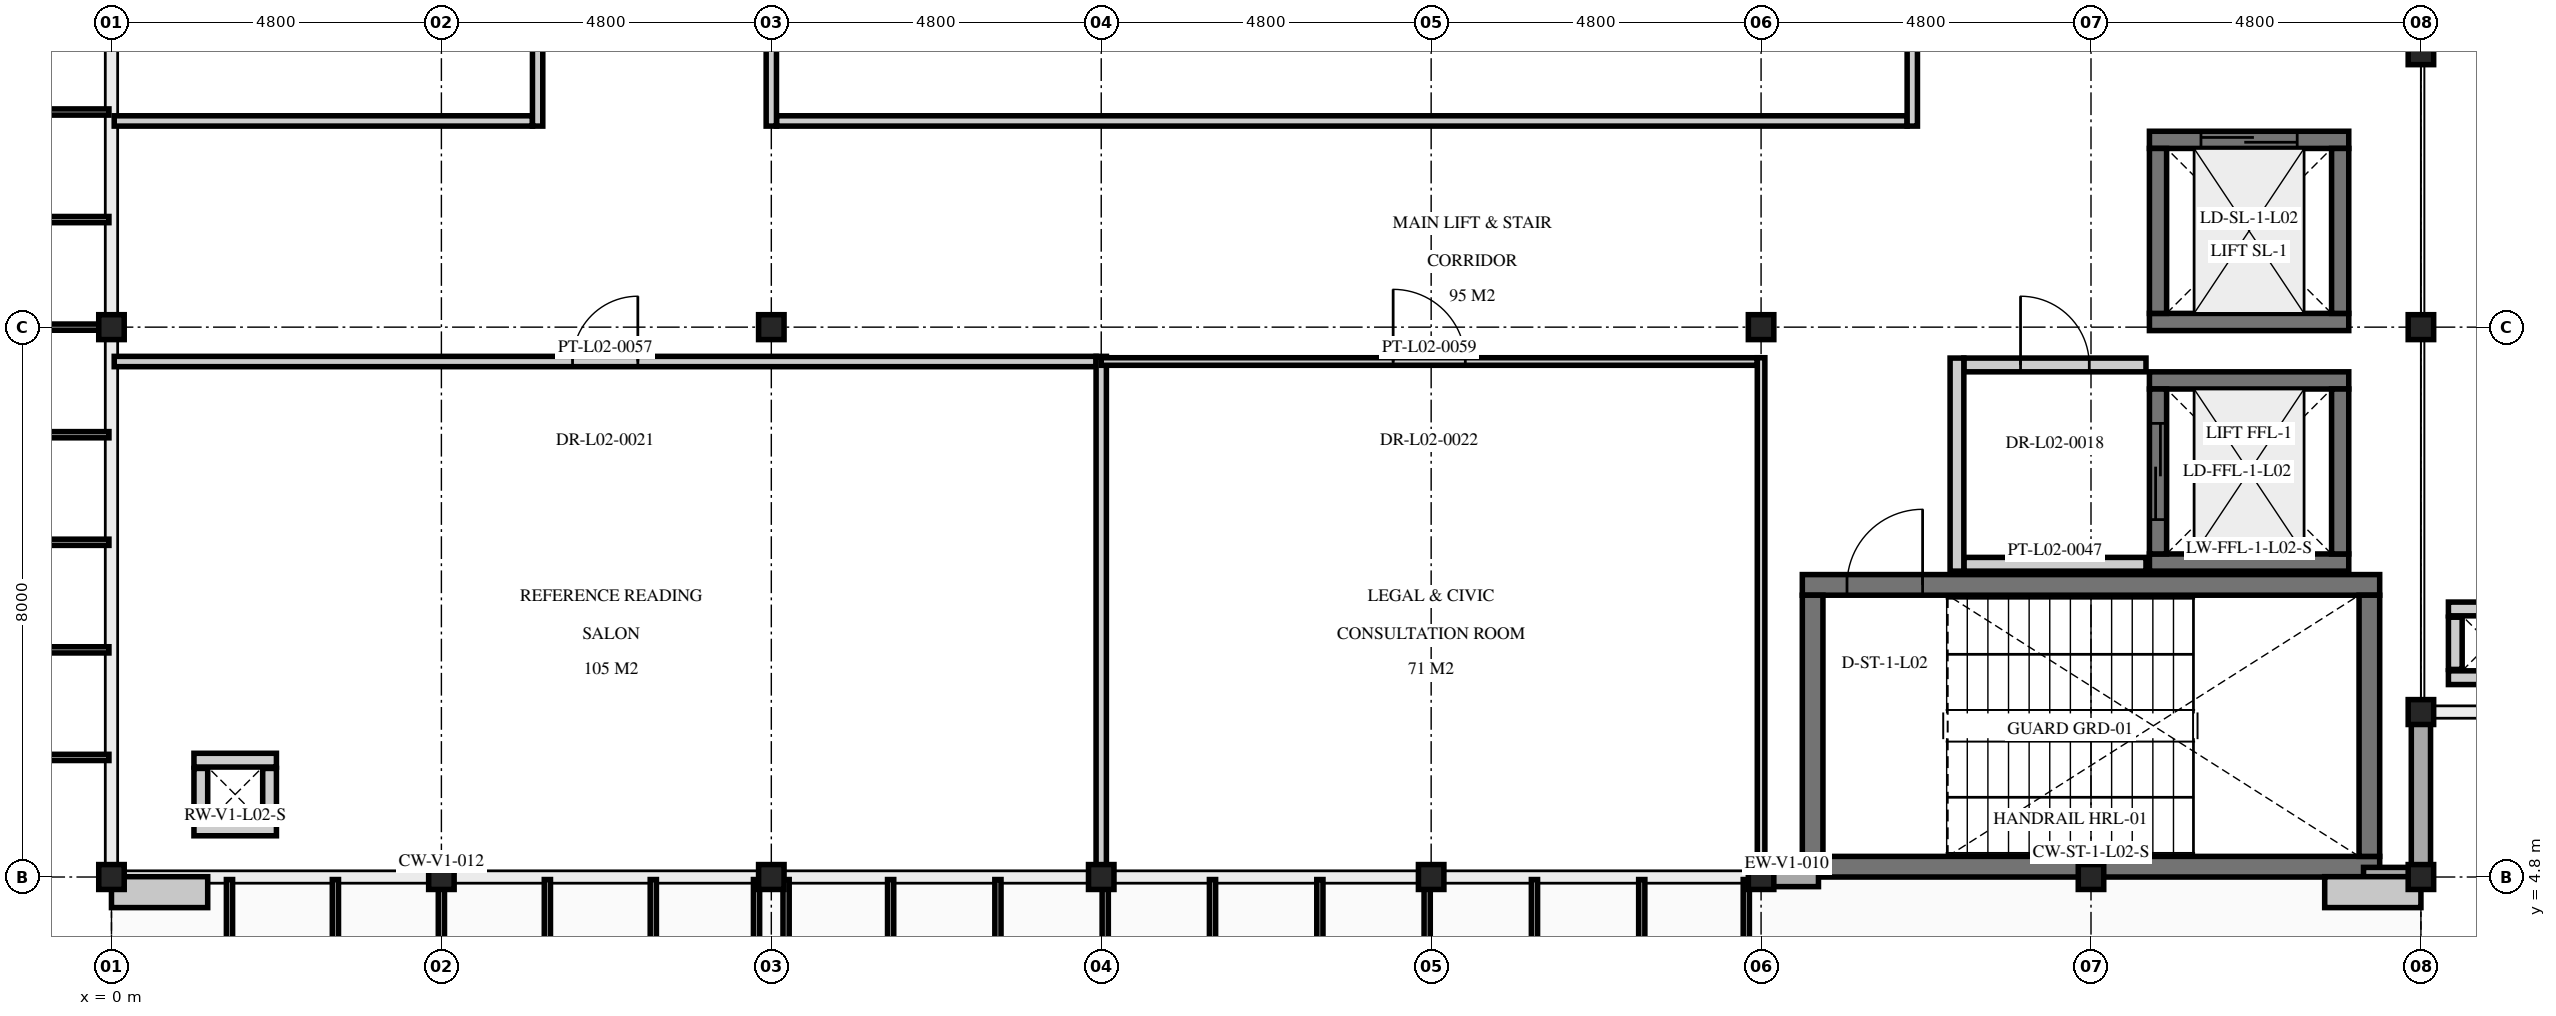
"""IFC4 building model, lengths in metres.
Left out: names, types, materials, properties, quantities, classifications, styles, units other than length and angle.
Written with IfcOpenShell. Run it as: python <this file> out.ifc"""

import sys

from ifc_helpers import new_model, si_unit, direction, frame, frame_2d, origin, origin_2d, place, context, subcontext, project, spatial, rectangle, i_section, extrude, element, fill, save


model = new_model("IFC4")
c1 = context("Model", 3, precision=1e-05, world=origin(), true_north=direction((0.0, 1.0)))
c2 = subcontext(c1, "Body", "Model", "MODEL_VIEW")
j1 = project(units=[si_unit("LENGTHUNIT", "METRE"), si_unit("PLANEANGLEUNIT", "RADIAN")], contexts=[c1])
p1 = place(None, origin())
s1 = spatial("IfcSite", under=j1, at=p1, CompositionType="ELEMENT")
p2 = place(p1, origin())
s2 = spatial("IfcBuilding", under=s1, at=p2, CompositionType="ELEMENT")
p3 = place(p2, frame((0.0, 0.0, 9.6)))
s3 = spatial("IfcBuildingStorey", under=s2, at=p3, CompositionType="ELEMENT", Elevation=9.6)
for number, where, z_axis, x_axis in (
    (1, (0.0, 4.8, 0.0), (0.0, 0.0, 1.0), (1.0, 0.0, 0.0)),
    (2, (4.8, 4.8, 0.0), (0.0, 0.0, 1.0), (1.0, 0.0, 0.0)),
    (3, (9.6, 4.8, 0.0), (0.0, 0.0, 1.0), (1.0, 0.0, 0.0)),
    (4, (14.4, 4.8, 0.0), (0.0, 0.0, 1.0), (1.0, 0.0, 0.0)),
    (5, (19.2, 4.8, 0.0), (0.0, 0.0, 1.0), (1.0, 0.0, 0.0)),
    (6, (24.0, 4.8, 0.0), (0.0, 0.0, 1.0), (1.0, 0.0, 0.0)),
    (7, (28.8, 4.8, 0.0), (0.0, 0.0, 1.0), (1.0, 0.0, 0.0)),
    (8, (33.6, 4.8, 0.0), (0.0, 0.0, 1.0), (1.0, 0.0, 0.0)),
    (9, (0.0, 12.8, 0.0), (0.0, 0.0, 1.0), (1.0, 0.0, 0.0)),
    (10, (33.6, 7.2, 0.0), (0.0, 0.0, 1.0), (1.0, 0.0, 0.0)),
    (11, (33.6, 12.8, 0.0), (0.0, 0.0, 1.0), (1.0, 0.0, 0.0)),
    (12, (33.6, 16.8, 0.0), (0.0, 0.0, 1.0), (1.0, 0.0, 0.0)),
    (13, (9.6, 12.8, 0.0), (0.0, 0.0, 1.0), (1.0, 0.0, 0.0)),
    (14, (24.0, 12.8, 0.0), (0.0, 0.0, 1.0), (1.0, 0.0, 0.0)),
):
    element("IfcColumn", number, at=place(p3, frame(where, z_axis=z_axis, x_axis=x_axis)), inside=s3, PredefinedType="COLUMN", context=c2, shape_type="SweptSolid", body=[
        extrude(i_section(OverallWidth=0.371, OverallDepth=0.362, WebThickness=0.012, FlangeThickness=0.021, at=origin_2d()), origin(), (0.0, 0.0, 1.0), 4.5),
    ])
p4 = place(p3, frame((33.0, 4.95, 0.0), z_axis=(0.0, 0.0, 1.0), x_axis=(-1.0, 0.0, 0.0)))
e15 = element("IfcWall", 15, at=p4, inside=s3, PredefinedType="SHEAR", context=c2, shape_type="SweptSolid", body=[
    extrude(rectangle(XDim=8.4, YDim=0.3, at=frame_2d((4.2, 0.0))), origin(), (0.0, 0.0, 1.0), 4.26),
])
p5 = place(p3, frame((24.6, 9.05, 0.0), z_axis=(0.0, 0.0, 1.0), x_axis=(1.0, 0.0, 0.0)))
e16 = element("IfcWall", 16, at=p5, inside=s3, PredefinedType="SHEAR", context=c2, shape_type="SweptSolid", body=[
    extrude(rectangle(XDim=8.4, YDim=0.3, at=frame_2d((4.2, 0.0))), origin(), (0.0, 0.0, 1.0), 4.26),
])
p6 = place(p5, frame((0.65, 0.0, 0.0)))
e17 = element("IfcOpeningElement", 17, at=p6, cuts=e16, PredefinedType="OPENING", context=c2, shape_type="SweptSolid", body=[
    extrude(rectangle(XDim=1.1, YDim=2.2, at=frame_2d((0.55, 1.1))), frame((0.0, 0.16, 0.0), z_axis=(0.0, -1.0, 0.0), x_axis=(1.0, 0.0, 0.0)), (0.0, 0.0, 1.0), 0.32),
])
for number, where, z_axis, x_axis in (
    (18, (24.75, 5.1, 0.0), (0.0, 0.0, 1.0), (0.0, 1.0, 0.0)),
    (19, (32.85, 8.9, 0.0), (0.0, 0.0, 1.0), (0.0, -1.0, 0.0)),
):
    element("IfcWall", number, at=place(p3, frame(where, z_axis=z_axis, x_axis=x_axis)), inside=s3, PredefinedType="SHEAR", context=c2, shape_type="SweptSolid", body=[
        extrude(rectangle(XDim=3.8, YDim=0.3, at=frame_2d((1.9, 0.0))), origin(), (0.0, 0.0, 1.0), 4.26),
    ])
for number, where, z_axis, x_axis in (
    (20, (32.55, 9.375, 0.0), (0.0, 0.0, 1.0), (-1.0, 0.0, 0.0)),
    (21, (29.65, 12.025, 0.0), (0.0, 0.0, 1.0), (1.0, 0.0, 0.0)),
):
    element("IfcWall", number, at=place(p3, frame(where, z_axis=z_axis, x_axis=x_axis)), inside=s3, PredefinedType="SHEAR", context=c2, shape_type="SweptSolid", body=[
        extrude(rectangle(XDim=2.9, YDim=0.25, at=frame_2d((1.45, 0.0))), origin(), (0.0, 0.0, 1.0), 4.26),
    ])
p7 = place(p3, frame((29.775, 9.5, 0.0), z_axis=(0.0, 0.0, 1.0), x_axis=(0.0, 1.0, 0.0)))
e22 = element("IfcWall", 22, at=p7, inside=s3, PredefinedType="SHEAR", context=c2, shape_type="SweptSolid", body=[
    extrude(rectangle(XDim=2.4, YDim=0.25, at=frame_2d((1.2, 0.0))), origin(), (0.0, 0.0, 1.0), 4.26),
])
p8 = place(p7, frame((0.5, 0.0, 0.0)))
e23 = element("IfcOpeningElement", 23, at=p8, cuts=e22, PredefinedType="OPENING", context=c2, shape_type="SweptSolid", body=[
    extrude(rectangle(XDim=1.4, YDim=2.2, at=frame_2d((0.7, 1.1))), frame((0.0, 0.135, 0.0), z_axis=(0.0, -1.0, 0.0), x_axis=(1.0, 0.0, 0.0)), (0.0, 0.0, 1.0), 0.27),
])
p9 = place(p3, frame((32.425, 11.9, 0.0), z_axis=(0.0, 0.0, 1.0), x_axis=(0.0, -1.0, 0.0)))
e24 = element("IfcWall", 24, at=p9, inside=s3, PredefinedType="SHEAR", context=c2, shape_type="SweptSolid", body=[
    extrude(rectangle(XDim=2.4, YDim=0.25, at=frame_2d((1.2, 0.0))), origin(), (0.0, 0.0, 1.0), 4.26),
])
p10 = place(p3, frame((32.55, 12.875, 0.0), z_axis=(0.0, 0.0, 1.0), x_axis=(-1.0, 0.0, 0.0)))
e25 = element("IfcWall", 25, at=p10, inside=s3, PredefinedType="SHEAR", context=c2, shape_type="SweptSolid", body=[
    extrude(rectangle(XDim=2.9, YDim=0.25, at=frame_2d((1.45, 0.0))), origin(), (0.0, 0.0, 1.0), 4.26),
])
p11 = place(p3, frame((29.65, 15.525, 0.0), z_axis=(0.0, 0.0, 1.0), x_axis=(1.0, 0.0, 0.0)))
e26 = element("IfcWall", 26, at=p11, inside=s3, PredefinedType="SHEAR", context=c2, shape_type="SweptSolid", body=[
    extrude(rectangle(XDim=2.9, YDim=0.25, at=frame_2d((1.45, 0.0))), origin(), (0.0, 0.0, 1.0), 4.26),
])
p12 = place(p11, frame((0.75, 0.0, 0.0)))
e27 = element("IfcOpeningElement", 27, at=p12, cuts=e26, PredefinedType="OPENING", context=c2, shape_type="SweptSolid", body=[
    extrude(rectangle(XDim=1.4, YDim=2.2, at=frame_2d((0.7, 1.1))), frame((0.0, 0.135, 0.0), z_axis=(0.0, -1.0, 0.0), x_axis=(1.0, 0.0, 0.0)), (0.0, 0.0, 1.0), 0.27),
])
for number, where, z_axis, x_axis in (
    (28, (29.775, 13.0, 0.0), (0.0, 0.0, 1.0), (0.0, 1.0, 0.0)),
    (29, (32.425, 15.4, 0.0), (0.0, 0.0, 1.0), (0.0, -1.0, 0.0)),
):
    element("IfcWall", number, at=place(p3, frame(where, z_axis=z_axis, x_axis=x_axis)), inside=s3, PredefinedType="SHEAR", context=c2, shape_type="SweptSolid", body=[
        extrude(rectangle(XDim=2.4, YDim=0.25, at=frame_2d((1.2, 0.0))), origin(), (0.0, 0.0, 1.0), 4.26),
    ])
for number, where, z_axis, x_axis in (
    (30, (2.4, 5.5, 0.0), (0.0, 0.0, 1.0), (-1.0, 0.0, 0.0)),
    (31, (1.2, 6.5, 0.0), (0.0, 0.0, 1.0), (1.0, 0.0, 0.0)),
):
    element("IfcWall", number, at=place(p3, frame(where, z_axis=z_axis, x_axis=x_axis)), inside=s3, PredefinedType="PARTITIONING", context=c2, shape_type="SweptSolid", body=[
        extrude(rectangle(XDim=1.2, YDim=0.2, at=frame_2d((0.6, 0.0))), origin(), (0.0, 0.0, 1.0), 3.76),
    ])
for number, where, z_axis, x_axis in (
    (32, (1.3, 5.62, 0.0), (0.0, 0.0, 1.0), (0.0, 1.0, 0.0)),
    (33, (2.3, 6.38, 0.0), (0.0, 0.0, 1.0), (0.0, -1.0, 0.0)),
):
    element("IfcWall", number, at=place(p3, frame(where, z_axis=z_axis, x_axis=x_axis)), inside=s3, PredefinedType="PARTITIONING", context=c2, shape_type="SweptSolid", body=[
        extrude(rectangle(XDim=0.76, YDim=0.2, at=frame_2d((0.38, 0.0))), origin(), (0.0, 0.0, 1.0), 3.76),
    ])
for number, where, z_axis, x_axis in (
    (34, (35.2, 7.7, 0.0), (0.0, 0.0, 1.0), (-1.0, 0.0, 0.0)),
    (35, (34.0, 8.7, 0.0), (0.0, 0.0, 1.0), (1.0, 0.0, 0.0)),
):
    element("IfcWall", number, at=place(p3, frame(where, z_axis=z_axis, x_axis=x_axis)), inside=s3, PredefinedType="PARTITIONING", context=c2, shape_type="SweptSolid", body=[
        extrude(rectangle(XDim=1.2, YDim=0.2, at=frame_2d((0.6, 0.0))), origin(), (0.0, 0.0, 1.0), 3.76),
    ])
p13 = place(p3, frame((34.1, 7.82, 0.0), z_axis=(0.0, 0.0, 1.0), x_axis=(0.0, 1.0, 0.0)))
e36 = element("IfcWall", 36, at=p13, inside=s3, PredefinedType="PARTITIONING", context=c2, shape_type="SweptSolid", body=[
    extrude(rectangle(XDim=0.76, YDim=0.2, at=frame_2d((0.38, 0.0))), origin(), (0.0, 0.0, 1.0), 3.76),
])
p14 = place(p3, frame((24.835, 4.8, 0.0), z_axis=(0.0, 0.0, 1.0), x_axis=(-1.0, 0.0, 0.0)))
e37 = element("IfcWall", 37, at=p14, inside=s3, PredefinedType="SOLIDWALL", context=c2, shape_type="SweptSolid", body=[
    extrude(rectangle(XDim=0.92, YDim=0.28, at=frame_2d((0.46, 0.0))), origin(), (0.0, 0.0, 1.0), 3.685),
])
p15 = place(p3, frame((33.685, 4.8, 0.0), z_axis=(0.0, 0.0, 1.0), x_axis=(-1.0, 0.0, 0.0)))
e38 = element("IfcWall", 38, at=p15, inside=s3, PredefinedType="SOLIDWALL", context=c2, shape_type="SweptSolid", body=[
    extrude(rectangle(XDim=0.92, YDim=0.28, at=frame_2d((0.46, 0.0))), origin(), (0.0, 0.0, 1.0), 3.685),
])
p16 = place(p3, frame((33.6, 7.285, 0.0), z_axis=(0.0, 0.0, 1.0), x_axis=(0.0, -1.0, 0.0)))
e39 = element("IfcWall", 39, at=p16, inside=s3, PredefinedType="SOLIDWALL", context=c2, shape_type="SweptSolid", body=[
    extrude(rectangle(XDim=2.57, YDim=0.28, at=frame_2d((1.285, 0.0))), origin(), (0.0, 0.0, 1.0), 3.685),
])
p17 = place(p3, frame((26.95, 9.35, 0.0), z_axis=(0.0, 0.0, 1.0), x_axis=(1.0, 0.0, 0.0)))
e40 = element("IfcWall", 40, at=p17, inside=s3, PredefinedType="PARTITIONING", context=c2, shape_type="SweptSolid", body=[
    extrude(rectangle(XDim=2.65, YDim=0.2, at=frame_2d((1.325, 0.0))), origin(), (0.0, 0.0, 1.0), 4.26),
])
p18 = place(p3, frame((26.95, 12.25, 0.0), z_axis=(0.0, 0.0, 1.0), x_axis=(1.0, 0.0, 0.0)))
e41 = element("IfcWall", 41, at=p18, inside=s3, PredefinedType="PARTITIONING", context=c2, shape_type="SweptSolid", body=[
    extrude(rectangle(XDim=2.65, YDim=0.2, at=frame_2d((1.325, 0.0))), origin(), (0.0, 0.0, 1.0), 4.26),
])
p19 = place(p18, frame((0.825, 0.0, 0.0)))
e42 = element("IfcOpeningElement", 42, at=p19, cuts=e41, PredefinedType="OPENING", context=c2, shape_type="SweptSolid", body=[
    extrude(rectangle(XDim=1.0, YDim=2.2, at=frame_2d((0.5, 1.1))), frame((0.0, 0.11, 0.0), z_axis=(0.0, -1.0, 0.0), x_axis=(1.0, 0.0, 0.0)), (0.0, 0.0, 1.0), 0.22),
])
p20 = place(p3, frame((26.85, 9.25, 0.0), z_axis=(0.0, 0.0, 1.0), x_axis=(0.0, 1.0, 0.0)))
e43 = element("IfcWall", 43, at=p20, inside=s3, PredefinedType="PARTITIONING", context=c2, shape_type="SweptSolid", body=[
    extrude(rectangle(XDim=3.1, YDim=0.2, at=frame_2d((1.55, 0.0))), origin(), (0.0, 0.0, 1.0), 4.26),
])
p21 = place(p3, frame((0.04, 12.3, 0.0), z_axis=(0.0, 0.0, 1.0), x_axis=(1.0, 0.0, 0.0)))
e44 = element("IfcWall", 44, at=p21, inside=s3, PredefinedType="PARTITIONING", context=c2, shape_type="SweptSolid", body=[
    extrude(rectangle(XDim=14.285, YDim=0.15, at=frame_2d((7.143, 0.0))), origin(), (0.0, 0.0, 1.0), 3.785),
])
p22 = place(p21, frame((6.668, 0.0, 0.0)))
e45 = element("IfcOpeningElement", 45, at=p22, cuts=e44, PredefinedType="OPENING", context=c2, shape_type="SweptSolid", body=[
    extrude(rectangle(XDim=0.95, YDim=2.15, at=frame_2d((0.475, 1.075))), frame((0.0, 0.085, 0.0), z_axis=(0.0, -1.0, 0.0), x_axis=(1.0, 0.0, 0.0)), (0.0, 0.0, 1.0), 0.17),
])
p23 = place(p3, frame((14.4, 4.84, 0.0), z_axis=(0.0, 0.0, 1.0), x_axis=(0.0, 1.0, 0.0)))
e46 = element("IfcWall", 46, at=p23, inside=s3, PredefinedType="PARTITIONING", context=c2, shape_type="SweptSolid", body=[
    extrude(rectangle(XDim=7.535, YDim=0.15, at=frame_2d((3.768, 0.0))), origin(), (0.0, 0.0, 1.0), 3.685),
])
p24 = place(p3, frame((14.4, 12.3, 0.0), z_axis=(0.0, 0.0, 1.0), x_axis=(1.0, 0.0, 0.0)))
e47 = element("IfcWall", 47, at=p24, inside=s3, PredefinedType="PARTITIONING", context=c2, shape_type="SweptSolid", body=[
    extrude(rectangle(XDim=9.545, YDim=0.11, at=frame_2d((4.772, 0.0))), origin(), (0.0, 0.0, 1.0), 3.785),
])
p25 = place(p24, frame((4.247, 0.0, 0.0)))
e48 = element("IfcOpeningElement", 48, at=p25, cuts=e47, PredefinedType="OPENING", context=c2, shape_type="SweptSolid", body=[
    extrude(rectangle(XDim=1.05, YDim=2.2, at=frame_2d((0.525, 1.1))), frame((0.0, 0.065, 0.0), z_axis=(0.0, -1.0, 0.0), x_axis=(1.0, 0.0, 0.0)), (0.0, 0.0, 1.0), 0.13),
])
p26 = place(p3, frame((24.0, 4.84, 0.0), z_axis=(0.0, 0.0, 1.0), x_axis=(0.0, 1.0, 0.0)))
e49 = element("IfcWall", 49, at=p26, inside=s3, PredefinedType="PARTITIONING", context=c2, shape_type="SweptSolid", body=[
    extrude(rectangle(XDim=7.515, YDim=0.11, at=frame_2d((3.757, 0.0))), origin(), (0.0, 0.0, 1.0), 3.685),
])
p27 = place(p3, frame((0.04, 15.8, 0.0), z_axis=(0.0, 0.0, 1.0), x_axis=(1.0, 0.0, 0.0)))
e50 = element("IfcWall", 50, at=p27, inside=s3, PredefinedType="PARTITIONING", context=c2, shape_type="SweptSolid", body=[
    extrude(rectangle(XDim=6.085, YDim=0.15, at=frame_2d((3.042, 0.0))), origin(), (0.0, 0.0, 1.0), 3.785),
])
p28 = place(p3, frame((6.2, 15.725, 0.0), z_axis=(0.0, 0.0, 1.0), x_axis=(0.0, 1.0, 0.0)))
e51 = element("IfcWall", 51, at=p28, inside=s3, PredefinedType="PARTITIONING", context=c2, shape_type="SweptSolid", body=[
    extrude(rectangle(XDim=7.71, YDim=0.15, at=frame_2d((3.855, 0.0))), origin(), (0.0, 0.0, 1.0), 3.685),
])
p29 = place(p28, frame((3.38, 0.0, 0.0)))
e52 = element("IfcOpeningElement", 52, at=p29, cuts=e51, PredefinedType="OPENING", context=c2, shape_type="SweptSolid", body=[
    extrude(rectangle(XDim=0.95, YDim=2.15, at=frame_2d((0.475, 1.075))), frame((0.0, 0.085, 0.0), z_axis=(0.0, -1.0, 0.0), x_axis=(1.0, 0.0, 0.0)), (0.0, 0.0, 1.0), 0.17),
])
p30 = place(p3, frame((9.675, 15.8, 0.0), z_axis=(0.0, 0.0, 1.0), x_axis=(1.0, 0.0, 0.0)))
e53 = element("IfcWall", 53, at=p30, inside=s3, PredefinedType="PARTITIONING", context=c2, shape_type="SweptSolid", body=[
    extrude(rectangle(XDim=16.45, YDim=0.15, at=frame_2d((8.225, 0.0))), origin(), (0.0, 0.0, 1.0), 3.785),
])
p31 = place(p3, frame((9.6, 15.725, 0.0), z_axis=(0.0, 0.0, 1.0), x_axis=(0.0, 1.0, 0.0)))
e54 = element("IfcWall", 54, at=p31, inside=s3, PredefinedType="PARTITIONING", context=c2, shape_type="SweptSolid", body=[
    extrude(rectangle(XDim=21.035, YDim=0.15, at=frame_2d((10.518, 0.0))), origin(), (0.0, 0.0, 1.0), 3.685),
])
p32 = place(p31, frame((9.717, 0.0, 0.0)))
e55 = element("IfcOpeningElement", 55, at=p32, cuts=e54, PredefinedType="OPENING", context=c2, shape_type="SweptSolid", body=[
    extrude(rectangle(XDim=1.6, YDim=2.25, at=frame_2d((0.8, 1.125))), frame((0.0, 0.085, 0.0), z_axis=(0.0, -1.0, 0.0), x_axis=(1.0, 0.0, 0.0)), (0.0, 0.0, 1.0), 0.17),
])
p33 = place(p3, frame((26.2, 15.725, 0.0), z_axis=(0.0, 0.0, 1.0), x_axis=(0.0, 1.0, 0.0)))
e56 = element("IfcWall", 56, at=p33, inside=s3, PredefinedType="PARTITIONING", context=c2, shape_type="SweptSolid", body=[
    extrude(rectangle(XDim=21.035, YDim=0.15, at=frame_2d((10.518, 0.0))), origin(), (0.0, 0.0, 1.0), 3.685),
])
p34 = place(p6, origin())
e57 = element("IfcDoor", 57, at=p34, inside=s3, OperationType="SINGLE_SWING_RIGHT", PredefinedType="DOOR", context=c2, shape_type="SweptSolid", body=[
    extrude(rectangle(XDim=1.1, YDim=2.2, at=frame_2d((0.55, 1.1))), frame((0.0, 0.025, 0.0), z_axis=(0.0, -1.0, 0.0), x_axis=(1.0, 0.0, 0.0)), (0.0, 0.0, 1.0), 0.05),
])
fill(e17, e57)
p35 = place(p8, origin())
e58 = element("IfcDoor", 58, at=p35, inside=s3, OperationType="DOUBLE_DOOR_SLIDING", PredefinedType="DOOR", context=c2, shape_type="SweptSolid", body=[
    extrude(rectangle(XDim=1.4, YDim=2.2, at=frame_2d((0.7, 1.1))), frame((0.0, 0.025, 0.0), z_axis=(0.0, -1.0, 0.0), x_axis=(1.0, 0.0, 0.0)), (0.0, 0.0, 1.0), 0.05),
])
fill(e23, e58)
p36 = place(p12, origin())
e59 = element("IfcDoor", 59, at=p36, inside=s3, OperationType="DOUBLE_DOOR_SLIDING", PredefinedType="DOOR", context=c2, shape_type="SweptSolid", body=[
    extrude(rectangle(XDim=1.4, YDim=2.2, at=frame_2d((0.7, 1.1))), frame((0.0, 0.025, 0.0), z_axis=(0.0, -1.0, 0.0), x_axis=(1.0, 0.0, 0.0)), (0.0, 0.0, 1.0), 0.05),
])
fill(e27, e59)
p37 = place(p19, origin())
e60 = element("IfcDoor", 60, at=p37, inside=s3, OperationType="SINGLE_SWING_LEFT", PredefinedType="DOOR", context=c2, shape_type="SweptSolid", body=[
    extrude(rectangle(XDim=1.0, YDim=2.2, at=frame_2d((0.5, 1.1))), frame((0.0, 0.025, 0.0), z_axis=(0.0, -1.0, 0.0), x_axis=(1.0, 0.0, 0.0)), (0.0, 0.0, 1.0), 0.05),
])
fill(e42, e60)
p38 = place(p22, origin())
e61 = element("IfcDoor", 61, at=p38, inside=s3, OperationType="SINGLE_SWING_RIGHT", PredefinedType="DOOR", context=c2, shape_type="SweptSolid", body=[
    extrude(rectangle(XDim=0.95, YDim=2.15, at=frame_2d((0.475, 1.075))), frame((0.0, 0.025, 0.0), z_axis=(0.0, -1.0, 0.0), x_axis=(1.0, 0.0, 0.0)), (0.0, 0.0, 1.0), 0.05),
])
fill(e45, e61)
p39 = place(p25, origin())
e62 = element("IfcDoor", 62, at=p39, inside=s3, OperationType="SINGLE_SWING_LEFT", PredefinedType="DOOR", context=c2, shape_type="SweptSolid", body=[
    extrude(rectangle(XDim=1.05, YDim=2.2, at=frame_2d((0.525, 1.1))), frame((0.0, 0.025, 0.0), z_axis=(0.0, -1.0, 0.0), x_axis=(1.0, 0.0, 0.0)), (0.0, 0.0, 1.0), 0.05),
])
fill(e48, e62)
save(model, sys.argv[1])
